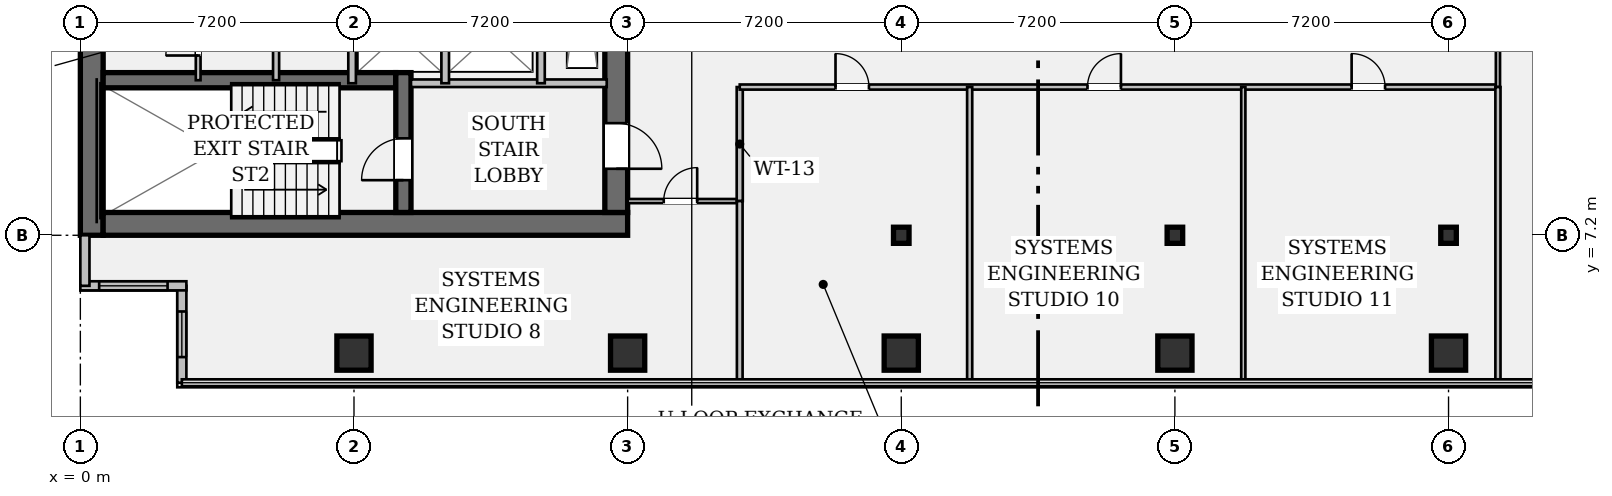
"""IFC4 building model, lengths in metres.
Left out: names, types, materials, properties, quantities, classifications, styles, units other than length and angle.
Written with IfcOpenShell. Run it as: python <this file> out.ifc"""

import sys

from ifc_helpers import new_model, si_unit, direction, frame, frame_2d, origin, origin_2d, place, context, subcontext, project, spatial, rectangle, hollow_rectangle, i_section, extrude, element, fill, save


model = new_model("IFC4")
c1 = context("Model", 3, precision=1e-05, world=origin(), true_north=direction((0.0, 1.0)))
c2 = subcontext(c1, "Body", "Model", "MODEL_VIEW")
j1 = project(units=[si_unit("LENGTHUNIT", "METRE"), si_unit("PLANEANGLEUNIT", "RADIAN")], contexts=[c1])
p1 = place(None, origin())
s1 = spatial("IfcSite", under=j1, at=p1, CompositionType="ELEMENT")
p2 = place(p1, origin())
s2 = spatial("IfcBuilding", under=s1, at=p2, CompositionType="ELEMENT")
p3 = place(p2, frame((0.0, 0.0, 136.85)))
s3 = spatial("IfcBuildingStorey", under=s2, at=p3, CompositionType="ELEMENT", Elevation=136.85)
p4 = place(p3, frame((0.3, 7.2, 0.0), z_axis=(0.0, 0.0, 1.0), x_axis=(0.0, 1.0, 0.0)))
e1 = element("IfcWall", 1, at=p4, inside=s3, PredefinedType="SHEAR", context=c2, shape_type="SweptSolid", body=[
    extrude(rectangle(XDim=28.8, YDim=0.6, at=frame_2d((14.4, 0.0))), origin(), (0.0, 0.0, 1.0), 3.58),
])
p5 = place(p3, frame((0.6, 7.5, 0.0), z_axis=(0.0, 0.0, 1.0), x_axis=(1.0, 0.0, 0.0)))
e2 = element("IfcWall", 2, at=p5, inside=s3, PredefinedType="SHEAR", context=c2, shape_type="SweptSolid", body=[
    extrude(rectangle(XDim=13.8, YDim=0.6, at=frame_2d((6.9, 0.0))), origin(), (0.0, 0.0, 1.0), 3.58),
])
p6 = place(p3, frame((14.1, 35.4, 0.0), z_axis=(0.0, 0.0, 1.0), x_axis=(0.0, -1.0, 0.0)))
e3 = element("IfcWall", 3, at=p6, inside=s3, PredefinedType="SHEAR", context=c2, shape_type="SweptSolid", body=[
    extrude(rectangle(XDim=27.6, YDim=0.6, at=frame_2d((13.8, 0.0))), origin(), (0.0, 0.0, 1.0), 3.58),
])
p7 = place(p6, frame((1.3, 0.0, 0.0)))
e4 = element("IfcOpeningElement", 4, at=p7, cuts=e3, PredefinedType="OPENING", context=c2, shape_type="SweptSolid", body=[
    extrude(rectangle(XDim=1.2, YDim=2.15, at=frame_2d((0.6, 1.075))), frame((0.0, 0.312, 0.0), z_axis=(0.0, -1.0, 0.0), x_axis=(1.0, 0.0, 0.0)), (0.0, 0.0, 1.0), 0.624),
])
p8 = place(p6, frame((25.25, 0.0, 0.0)))
e5 = element("IfcOpeningElement", 5, at=p8, cuts=e3, PredefinedType="OPENING", context=c2, shape_type="SweptSolid", body=[
    extrude(rectangle(XDim=1.2, YDim=2.15, at=frame_2d((0.6, 1.075))), frame((0.0, 0.312, 0.0), z_axis=(0.0, -1.0, 0.0), x_axis=(1.0, 0.0, 0.0)), (0.0, 0.0, 1.0), 0.624),
])
p9 = place(p6, frame((14.6, 0.0, 0.0)))
e6 = element("IfcOpeningElement", 6, at=p9, cuts=e3, PredefinedType="OPENING", context=c2, shape_type="SweptSolid", body=[
    extrude(rectangle(XDim=1.6, YDim=2.2, at=frame_2d((0.8, 1.1))), frame((0.0, 0.312, 0.0), z_axis=(0.0, -1.0, 0.0), x_axis=(1.0, 0.0, 0.0)), (0.0, 0.0, 1.0), 0.624),
])
p10 = place(p3, frame((0.6, 11.28, 0.0), z_axis=(0.0, 0.0, 1.0), x_axis=(1.0, 0.0, 0.0)))
e7 = element("IfcWall", 7, at=p10, inside=s3, PredefinedType="SHEAR", context=c2, shape_type="SweptSolid", body=[
    extrude(rectangle(XDim=7.7, YDim=0.4, at=frame_2d((3.85, 0.0))), origin(), (0.0, 0.0, 1.0), 3.58),
])
p11 = place(p3, frame((8.5, 7.8, 0.0), z_axis=(0.0, 0.0, 1.0), x_axis=(0.0, 1.0, 0.0)))
e8 = element("IfcWall", 8, at=p11, inside=s3, PredefinedType="SHEAR", context=c2, shape_type="SweptSolid", body=[
    extrude(rectangle(XDim=3.68, YDim=0.4, at=frame_2d((1.84, 0.0))), origin(), (0.0, 0.0, 1.0), 3.58),
])
p12 = place(p11, frame((0.85, 0.0, 0.0)))
e9 = element("IfcOpeningElement", 9, at=p12, cuts=e8, PredefinedType="OPENING", context=c2, shape_type="SweptSolid", body=[
    extrude(rectangle(XDim=1.1, YDim=2.15, at=frame_2d((0.55, 1.075))), frame((0.0, 0.212, 0.0), z_axis=(0.0, -1.0, 0.0), x_axis=(1.0, 0.0, 0.0)), (0.0, 0.0, 1.0), 0.424),
])
for number, where, z_axis, x_axis in (
    (10, (7.2, 4.1, 0.0), (0.0, 0.0, 1.0), (1.0, 0.0, 0.0)),
    (11, (14.4, 4.1, 0.0), (0.0, 0.0, 1.0), (1.0, 0.0, 0.0)),
    (12, (21.6, 4.1, 0.0), (0.0, 0.0, 1.0), (1.0, 0.0, 0.0)),
):
    element("IfcColumn", number, at=place(p3, frame(where, z_axis=z_axis, x_axis=x_axis)), inside=s3, PredefinedType="COLUMN", context=c2, shape_type="SweptSolid", body=[
        extrude(hollow_rectangle(XDim=0.9, YDim=0.9, WallThickness=0.055, at=origin_2d()), origin(), (0.0, 0.0, 1.0), 3.58),
    ])
p13 = place(p3, frame((21.6, 7.2, 0.0), z_axis=(0.0, 0.0, 1.0), x_axis=(1.0, 0.0, 0.0)))
e13 = element("IfcColumn", 13, at=p13, inside=s3, PredefinedType="COLUMN", context=c2, shape_type="SweptSolid", body=[
    extrude(i_section(OverallWidth=0.409, OverallDepth=0.424, WebThickness=0.033, FlangeThickness=0.052, FilletRadius=0.018, at=origin_2d()), origin(), (0.0, 0.0, 1.0), 3.58),
])
p14 = place(p3, frame((28.8, 4.1, 0.0), z_axis=(0.0, 0.0, 1.0), x_axis=(1.0, 0.0, 0.0)))
e14 = element("IfcColumn", 14, at=p14, inside=s3, PredefinedType="COLUMN", context=c2, shape_type="SweptSolid", body=[
    extrude(hollow_rectangle(XDim=0.9, YDim=0.9, WallThickness=0.055, at=origin_2d()), origin(), (0.0, 0.0, 1.0), 3.58),
])
p15 = place(p3, frame((28.8, 7.2, 0.0), z_axis=(0.0, 0.0, 1.0), x_axis=(1.0, 0.0, 0.0)))
e15 = element("IfcColumn", 15, at=p15, inside=s3, PredefinedType="COLUMN", context=c2, shape_type="SweptSolid", body=[
    extrude(i_section(OverallWidth=0.409, OverallDepth=0.424, WebThickness=0.033, FlangeThickness=0.052, FilletRadius=0.018, at=origin_2d()), origin(), (0.0, 0.0, 1.0), 3.58),
])
p16 = place(p3, frame((36.0, 4.1, 0.0), z_axis=(0.0, 0.0, 1.0), x_axis=(1.0, 0.0, 0.0)))
e16 = element("IfcColumn", 16, at=p16, inside=s3, PredefinedType="COLUMN", context=c2, shape_type="SweptSolid", body=[
    extrude(hollow_rectangle(XDim=0.9, YDim=0.9, WallThickness=0.055, at=origin_2d()), origin(), (0.0, 0.0, 1.0), 3.58),
])
p17 = place(p3, frame((36.0, 7.2, 0.0), z_axis=(0.0, 0.0, 1.0), x_axis=(1.0, 0.0, 0.0)))
e17 = element("IfcColumn", 17, at=p17, inside=s3, PredefinedType="COLUMN", context=c2, shape_type="SweptSolid", body=[
    extrude(i_section(OverallWidth=0.409, OverallDepth=0.424, WebThickness=0.033, FlangeThickness=0.052, FilletRadius=0.018, at=origin_2d()), origin(), (0.0, 0.0, 1.0), 3.58),
])
p18 = place(p3, frame((2.67, 3.32, 0.0), z_axis=(0.0, 0.0, 1.0), x_axis=(0.0, 1.0, 0.0)))
e18 = element("IfcWall", 18, at=p18, inside=s3, PredefinedType="STANDARD", context=c2, shape_type="SweptSolid", body=[
    extrude(rectangle(XDim=2.55, YDim=0.24, at=frame_2d((1.275, 0.0))), origin(), (0.0, 0.0, 1.0), 3.58),
])
p19 = place(p18, frame((0.675, 0.0, 0.95)))
e19 = element("IfcOpeningElement", 19, at=p19, cuts=e18, PredefinedType="OPENING", context=c2, shape_type="SweptSolid", body=[
    extrude(rectangle(XDim=1.2, YDim=1.8, at=frame_2d((0.6, 0.9))), frame((0.0, 0.132, 0.0), z_axis=(0.0, -1.0, 0.0), x_axis=(1.0, 0.0, 0.0)), (0.0, 0.0, 1.0), 0.264),
])
p20 = place(p3, frame((2.79, 5.87, 0.0), z_axis=(0.0, 0.0, 1.0), x_axis=(-1.0, 0.0, 0.0)))
e20 = element("IfcWall", 20, at=p20, inside=s3, PredefinedType="STANDARD", context=c2, shape_type="SweptSolid", body=[
    extrude(rectangle(XDim=2.79, YDim=0.24, at=frame_2d((1.395, 0.0))), origin(), (0.0, 0.0, 1.0), 3.58),
])
p21 = place(p20, frame((0.495, 0.0, 0.95)))
e21 = element("IfcOpeningElement", 21, at=p21, cuts=e20, PredefinedType="OPENING", context=c2, shape_type="SweptSolid", body=[
    extrude(rectangle(XDim=1.8, YDim=1.35, at=frame_2d((0.9, 0.675))), frame((0.0, 0.132, 0.0), z_axis=(0.0, -1.0, 0.0), x_axis=(1.0, 0.0, 0.0)), (0.0, 0.0, 1.0), 0.264),
])
p22 = place(p3, frame((0.12, 5.87, 0.0), z_axis=(0.0, 0.0, 1.0), x_axis=(0.0, 1.0, 0.0)))
e22 = element("IfcWall", 22, at=p22, inside=s3, PredefinedType="STANDARD", context=c2, shape_type="SweptSolid", body=[
    extrude(rectangle(XDim=1.33, YDim=0.24, at=frame_2d((0.665, 0.0))), origin(), (0.0, 0.0, 1.0), 3.58),
])
p23 = place(p3, frame((8.7, 11.2, 0.0), z_axis=(0.0, 0.0, 1.0), x_axis=(1.0, 0.0, 0.0)))
e23 = element("IfcWall", 23, at=p23, inside=s3, PredefinedType="PARTITIONING", context=c2, shape_type="SweptSolid", body=[
    extrude(rectangle(XDim=5.15, YDim=0.2, at=frame_2d((2.575, 0.0))), origin(), (0.0, 0.0, 1.0), 3.58),
])
for number, where, z_axis, x_axis in (
    (24, (7.15, 11.2, 0.0), (0.0, 0.0, 1.0), (0.0, 1.0, 0.0)),
    (25, (9.6, 11.2, 0.0), (0.0, 0.0, 1.0), (0.0, 1.0, 0.0)),
):
    element("IfcWall", number, at=place(p3, frame(where, z_axis=z_axis, x_axis=x_axis)), inside=s3, PredefinedType="PARTITIONING", context=c2, shape_type="SweptSolid", body=[
        extrude(rectangle(XDim=2.4, YDim=0.2, at=frame_2d((1.2, 0.0))), origin(), (0.0, 0.0, 1.0), 3.58),
    ])
p24 = place(p3, frame((12.12, 11.2, 0.0), z_axis=(0.0, 0.0, 1.0), x_axis=(0.0, 1.0, 0.0)))
e26 = element("IfcWall", 26, at=p24, inside=s3, PredefinedType="PARTITIONING", context=c2, shape_type="SweptSolid", body=[
    extrude(rectangle(XDim=6.6, YDim=0.2, at=frame_2d((3.3, 0.0))), origin(), (0.0, 0.0, 1.0), 3.58),
])
p25 = place(p24, frame((2.95, 0.0, 0.0)))
e27 = element("IfcOpeningElement", 27, at=p25, cuts=e26, PredefinedType="OPENING", context=c2, shape_type="SweptSolid", body=[
    extrude(rectangle(XDim=0.85, YDim=2.15, at=frame_2d((0.425, 1.075))), frame((0.0, 0.112, 0.0), z_axis=(0.0, -1.0, 0.0), x_axis=(1.0, 0.0, 0.0)), (0.0, 0.0, 1.0), 0.224),
])
p26 = place(p3, frame((5.15, 11.28, 0.0), z_axis=(0.0, 0.0, 1.0), x_axis=(0.0, 1.0, 0.0)))
e28 = element("IfcWall", 28, at=p26, inside=s3, PredefinedType="PARTITIONING", context=c2, shape_type="SweptSolid", body=[
    extrude(rectangle(XDim=4.42, YDim=0.16, at=frame_2d((2.21, 0.0))), origin(), (0.0, 0.0, 1.0), 3.58),
])
p27 = place(p3, frame((3.1, 11.28, 0.0), z_axis=(0.0, 0.0, 1.0), x_axis=(0.0, 1.0, 0.0)))
e29 = element("IfcWall", 29, at=p27, inside=s3, PredefinedType="PARTITIONING", context=c2, shape_type="SweptSolid", body=[
    extrude(rectangle(XDim=4.42, YDim=0.125, at=frame_2d((2.21, 0.0))), origin(), (0.0, 0.0, 1.0), 3.58),
])
p28 = place(p27, frame((0.65, 0.0, 0.0)))
e30 = element("IfcOpeningElement", 30, at=p28, cuts=e29, PredefinedType="OPENING", context=c2, shape_type="SweptSolid", body=[
    extrude(rectangle(XDim=0.85, YDim=2.15, at=frame_2d((0.425, 1.075))), frame((0.0, 0.074, 0.0), z_axis=(0.0, -1.0, 0.0), x_axis=(1.0, 0.0, 0.0)), (0.0, 0.0, 1.0), 0.149),
])
p29 = place(p27, frame((2.75, 0.0, 0.0)))
e31 = element("IfcOpeningElement", 31, at=p29, cuts=e29, PredefinedType="OPENING", context=c2, shape_type="SweptSolid", body=[
    extrude(rectangle(XDim=0.85, YDim=2.15, at=frame_2d((0.425, 1.075))), frame((0.0, 0.074, 0.0), z_axis=(0.0, -1.0, 0.0), x_axis=(1.0, 0.0, 0.0)), (0.0, 0.0, 1.0), 0.149),
])
p30 = place(p3, frame((14.4, 8.1, 0.0), z_axis=(0.0, 0.0, 1.0), x_axis=(1.0, 0.0, 0.0)))
e32 = element("IfcWall", 32, at=p30, inside=s3, PredefinedType="PARTITIONING", context=c2, shape_type="SweptSolid", body=[
    extrude(rectangle(XDim=2.95, YDim=0.11, at=frame_2d((1.475, 0.0))), origin(), (0.0, 0.0, 1.0), 3.148),
])
p31 = place(p30, frame((0.95, 0.0, 0.0)))
e33 = element("IfcOpeningElement", 33, at=p31, cuts=e32, PredefinedType="OPENING", context=c2, shape_type="SweptSolid", body=[
    extrude(rectangle(XDim=0.88, YDim=2.15, at=frame_2d((0.44, 1.075))), frame((0.0, 0.067, 0.0), z_axis=(0.0, -1.0, 0.0), x_axis=(1.0, 0.0, 0.0)), (0.0, 0.0, 1.0), 0.134),
])
p32 = place(p3, frame((17.35, 8.1, 0.0), z_axis=(0.0, 0.0, 1.0), x_axis=(0.0, 1.0, 0.0)))
e34 = element("IfcWall", 34, at=p32, inside=s3, PredefinedType="PARTITIONING", context=c2, shape_type="SweptSolid", body=[
    extrude(rectangle(XDim=3.0, YDim=0.16, at=frame_2d((1.5, 0.0))), origin(), (0.0, 0.0, 1.0), 3.58),
])
p33 = place(p3, frame((17.35, 11.1, 0.0), z_axis=(0.0, 0.0, 1.0), x_axis=(1.0, 0.0, 0.0)))
e35 = element("IfcWall", 35, at=p33, inside=s3, PredefinedType="PARTITIONING", context=c2, shape_type="SweptSolid", body=[
    extrude(rectangle(XDim=19.95, YDim=0.135, at=frame_2d((9.975, 0.0))), origin(), (0.0, 0.0, 1.0), 2.869),
])
p34 = place(p33, frame((2.52, 0.0, 0.0)))
e36 = element("IfcOpeningElement", 36, at=p34, cuts=e35, PredefinedType="OPENING", context=c2, shape_type="SweptSolid", body=[
    extrude(rectangle(XDim=0.88, YDim=2.15, at=frame_2d((0.44, 1.075))), frame((0.0, 0.08, 0.0), z_axis=(0.0, -1.0, 0.0), x_axis=(1.0, 0.0, 0.0)), (0.0, 0.0, 1.0), 0.159),
])
p35 = place(p33, frame((9.15, 0.0, 0.0)))
e37 = element("IfcOpeningElement", 37, at=p35, cuts=e35, PredefinedType="OPENING", context=c2, shape_type="SweptSolid", body=[
    extrude(rectangle(XDim=0.88, YDim=2.15, at=frame_2d((0.44, 1.075))), frame((0.0, 0.08, 0.0), z_axis=(0.0, -1.0, 0.0), x_axis=(1.0, 0.0, 0.0)), (0.0, 0.0, 1.0), 0.159),
])
p36 = place(p33, frame((16.1, 0.0, 0.0)))
e38 = element("IfcOpeningElement", 38, at=p36, cuts=e35, PredefinedType="OPENING", context=c2, shape_type="SweptSolid", body=[
    extrude(rectangle(XDim=0.88, YDim=2.15, at=frame_2d((0.44, 1.075))), frame((0.0, 0.08, 0.0), z_axis=(0.0, -1.0, 0.0), x_axis=(1.0, 0.0, 0.0)), (0.0, 0.0, 1.0), 0.159),
])
p37 = place(p3, frame((37.3, 11.1, 0.0), z_axis=(0.0, 0.0, 1.0), x_axis=(0.0, 1.0, 0.0)))
e39 = element("IfcWall", 39, at=p37, inside=s3, PredefinedType="PARTITIONING", context=c2, shape_type="SweptSolid", body=[
    extrude(rectangle(XDim=9.6, YDim=0.11, at=frame_2d((4.8, 0.0))), origin(), (0.0, 0.0, 1.0), 2.869),
])
p38 = place(p37, frame((1.2, 0.0, 0.0)))
e40 = element("IfcOpeningElement", 40, at=p38, cuts=e39, PredefinedType="OPENING", context=c2, shape_type="SweptSolid", body=[
    extrude(rectangle(XDim=0.88, YDim=2.15, at=frame_2d((0.44, 1.075))), frame((0.0, 0.067, 0.0), z_axis=(0.0, -1.0, 0.0), x_axis=(1.0, 0.0, 0.0)), (0.0, 0.0, 1.0), 0.134),
])
p39 = place(p37, frame((7.6, 0.0, 0.0)))
e41 = element("IfcOpeningElement", 41, at=p39, cuts=e39, PredefinedType="OPENING", context=c2, shape_type="SweptSolid", body=[
    extrude(rectangle(XDim=0.88, YDim=2.15, at=frame_2d((0.44, 1.075))), frame((0.0, 0.067, 0.0), z_axis=(0.0, -1.0, 0.0), x_axis=(1.0, 0.0, 0.0)), (0.0, 0.0, 1.0), 0.134),
])
p40 = place(p3, frame((37.3, 3.32, 0.0), z_axis=(0.0, 0.0, 1.0), x_axis=(0.0, 1.0, 0.0)))
e42 = element("IfcWall", 42, at=p40, inside=s3, PredefinedType="PARTITIONING", context=c2, shape_type="SweptSolid", body=[
    extrude(rectangle(XDim=7.78, YDim=0.135, at=frame_2d((3.89, 0.0))), origin(), (0.0, 0.0, 1.0), 2.869),
])
p41 = place(p3, frame((17.35, 3.32, 0.0), z_axis=(0.0, 0.0, 1.0), x_axis=(0.0, 1.0, 0.0)))
e43 = element("IfcWall", 43, at=p41, inside=s3, PredefinedType="PARTITIONING", context=c2, shape_type="SweptSolid", body=[
    extrude(rectangle(XDim=4.78, YDim=0.15, at=frame_2d((2.39, 0.0))), origin(), (0.0, 0.0, 1.0), 2.869),
])
p42 = place(p3, frame((23.4, 3.32, 0.0), z_axis=(0.0, 0.0, 1.0), x_axis=(0.0, 1.0, 0.0)))
e44 = element("IfcWall", 44, at=p42, inside=s3, PredefinedType="PARTITIONING", context=c2, shape_type="SweptSolid", body=[
    extrude(rectangle(XDim=7.78, YDim=0.135, at=frame_2d((3.89, 0.0))), origin(), (0.0, 0.0, 1.0), 2.869),
])
p43 = place(p3, frame((30.6, 3.32, 0.0), z_axis=(0.0, 0.0, 1.0), x_axis=(0.0, 1.0, 0.0)))
e45 = element("IfcWall", 45, at=p43, inside=s3, PredefinedType="PARTITIONING", context=c2, shape_type="SweptSolid", body=[
    extrude(rectangle(XDim=7.78, YDim=0.11, at=frame_2d((3.89, 0.0))), origin(), (0.0, 0.0, 1.0), 2.869),
])
p44 = place(p19, origin())
e46 = element("IfcWindow", 46, at=p44, inside=s3, PartitioningType="SINGLE_PANEL", PredefinedType="WINDOW", context=c2, shape_type="SweptSolid", body=[
    extrude(rectangle(XDim=1.2, YDim=1.8, at=frame_2d((0.6, 0.9))), frame((0.0, 0.03, 0.0), z_axis=(0.0, -1.0, 0.0), x_axis=(1.0, 0.0, 0.0)), (0.0, 0.0, 1.0), 0.06),
])
fill(e19, e46)
p45 = place(p21, origin())
e47 = element("IfcWindow", 47, at=p45, inside=s3, PartitioningType="SINGLE_PANEL", PredefinedType="WINDOW", context=c2, shape_type="SweptSolid", body=[
    extrude(rectangle(XDim=1.8, YDim=1.35, at=frame_2d((0.9, 0.675))), frame((0.0, 0.03, 0.0), z_axis=(0.0, -1.0, 0.0), x_axis=(1.0, 0.0, 0.0)), (0.0, 0.0, 1.0), 0.06),
])
fill(e21, e47)
p46 = place(p12, origin())
e48 = element("IfcDoor", 48, at=p46, inside=s3, OperationType="SINGLE_SWING_LEFT", PredefinedType="DOOR", context=c2, shape_type="SweptSolid", body=[
    extrude(rectangle(XDim=1.1, YDim=2.15, at=frame_2d((0.55, 1.075))), frame((0.0, 0.025, 0.0), z_axis=(0.0, -1.0, 0.0), x_axis=(1.0, 0.0, 0.0)), (0.0, 0.0, 1.0), 0.05),
])
fill(e9, e48)
p47 = place(p8, origin())
e49 = element("IfcDoor", 49, at=p47, inside=s3, OperationType="SINGLE_SWING_RIGHT", PredefinedType="DOOR", context=c2, shape_type="SweptSolid", body=[
    extrude(rectangle(XDim=1.2, YDim=2.15, at=frame_2d((0.6, 1.075))), frame((0.0, 0.025, 0.0), z_axis=(0.0, -1.0, 0.0), x_axis=(1.0, 0.0, 0.0)), (0.0, 0.0, 1.0), 0.05),
])
fill(e5, e49)
p48 = place(p28, origin())
e50 = element("IfcDoor", 50, at=p48, inside=s3, OperationType="SINGLE_SWING_LEFT", PredefinedType="DOOR", context=c2, shape_type="SweptSolid", body=[
    extrude(rectangle(XDim=0.85, YDim=2.15, at=frame_2d((0.425, 1.075))), frame((0.0, 0.025, 0.0), z_axis=(0.0, -1.0, 0.0), x_axis=(1.0, 0.0, 0.0)), (0.0, 0.0, 1.0), 0.05),
])
fill(e30, e50)
p49 = place(p31, origin())
e51 = element("IfcDoor", 51, at=p49, inside=s3, OperationType="SINGLE_SWING_RIGHT", PredefinedType="DOOR", context=c2, shape_type="SweptSolid", body=[
    extrude(rectangle(XDim=0.88, YDim=2.15, at=frame_2d((0.44, 1.075))), frame((0.0, 0.025, 0.0), z_axis=(0.0, -1.0, 0.0), x_axis=(1.0, 0.0, 0.0)), (0.0, 0.0, 1.0), 0.05),
])
fill(e33, e51)
p50 = place(p34, origin())
e52 = element("IfcDoor", 52, at=p50, inside=s3, OperationType="SINGLE_SWING_LEFT", PredefinedType="DOOR", context=c2, shape_type="SweptSolid", body=[
    extrude(rectangle(XDim=0.88, YDim=2.15, at=frame_2d((0.44, 1.075))), frame((0.0, 0.025, 0.0), z_axis=(0.0, -1.0, 0.0), x_axis=(1.0, 0.0, 0.0)), (0.0, 0.0, 1.0), 0.05),
])
fill(e36, e52)
p51 = place(p35, origin())
e53 = element("IfcDoor", 53, at=p51, inside=s3, OperationType="SINGLE_SWING_RIGHT", PredefinedType="DOOR", context=c2, shape_type="SweptSolid", body=[
    extrude(rectangle(XDim=0.88, YDim=2.15, at=frame_2d((0.44, 1.075))), frame((0.0, 0.025, 0.0), z_axis=(0.0, -1.0, 0.0), x_axis=(1.0, 0.0, 0.0)), (0.0, 0.0, 1.0), 0.05),
])
fill(e37, e53)
p52 = place(p36, origin())
e54 = element("IfcDoor", 54, at=p52, inside=s3, OperationType="SINGLE_SWING_LEFT", PredefinedType="DOOR", context=c2, shape_type="SweptSolid", body=[
    extrude(rectangle(XDim=0.88, YDim=2.15, at=frame_2d((0.44, 1.075))), frame((0.0, 0.025, 0.0), z_axis=(0.0, -1.0, 0.0), x_axis=(1.0, 0.0, 0.0)), (0.0, 0.0, 1.0), 0.05),
])
fill(e38, e54)
save(model, sys.argv[1])
